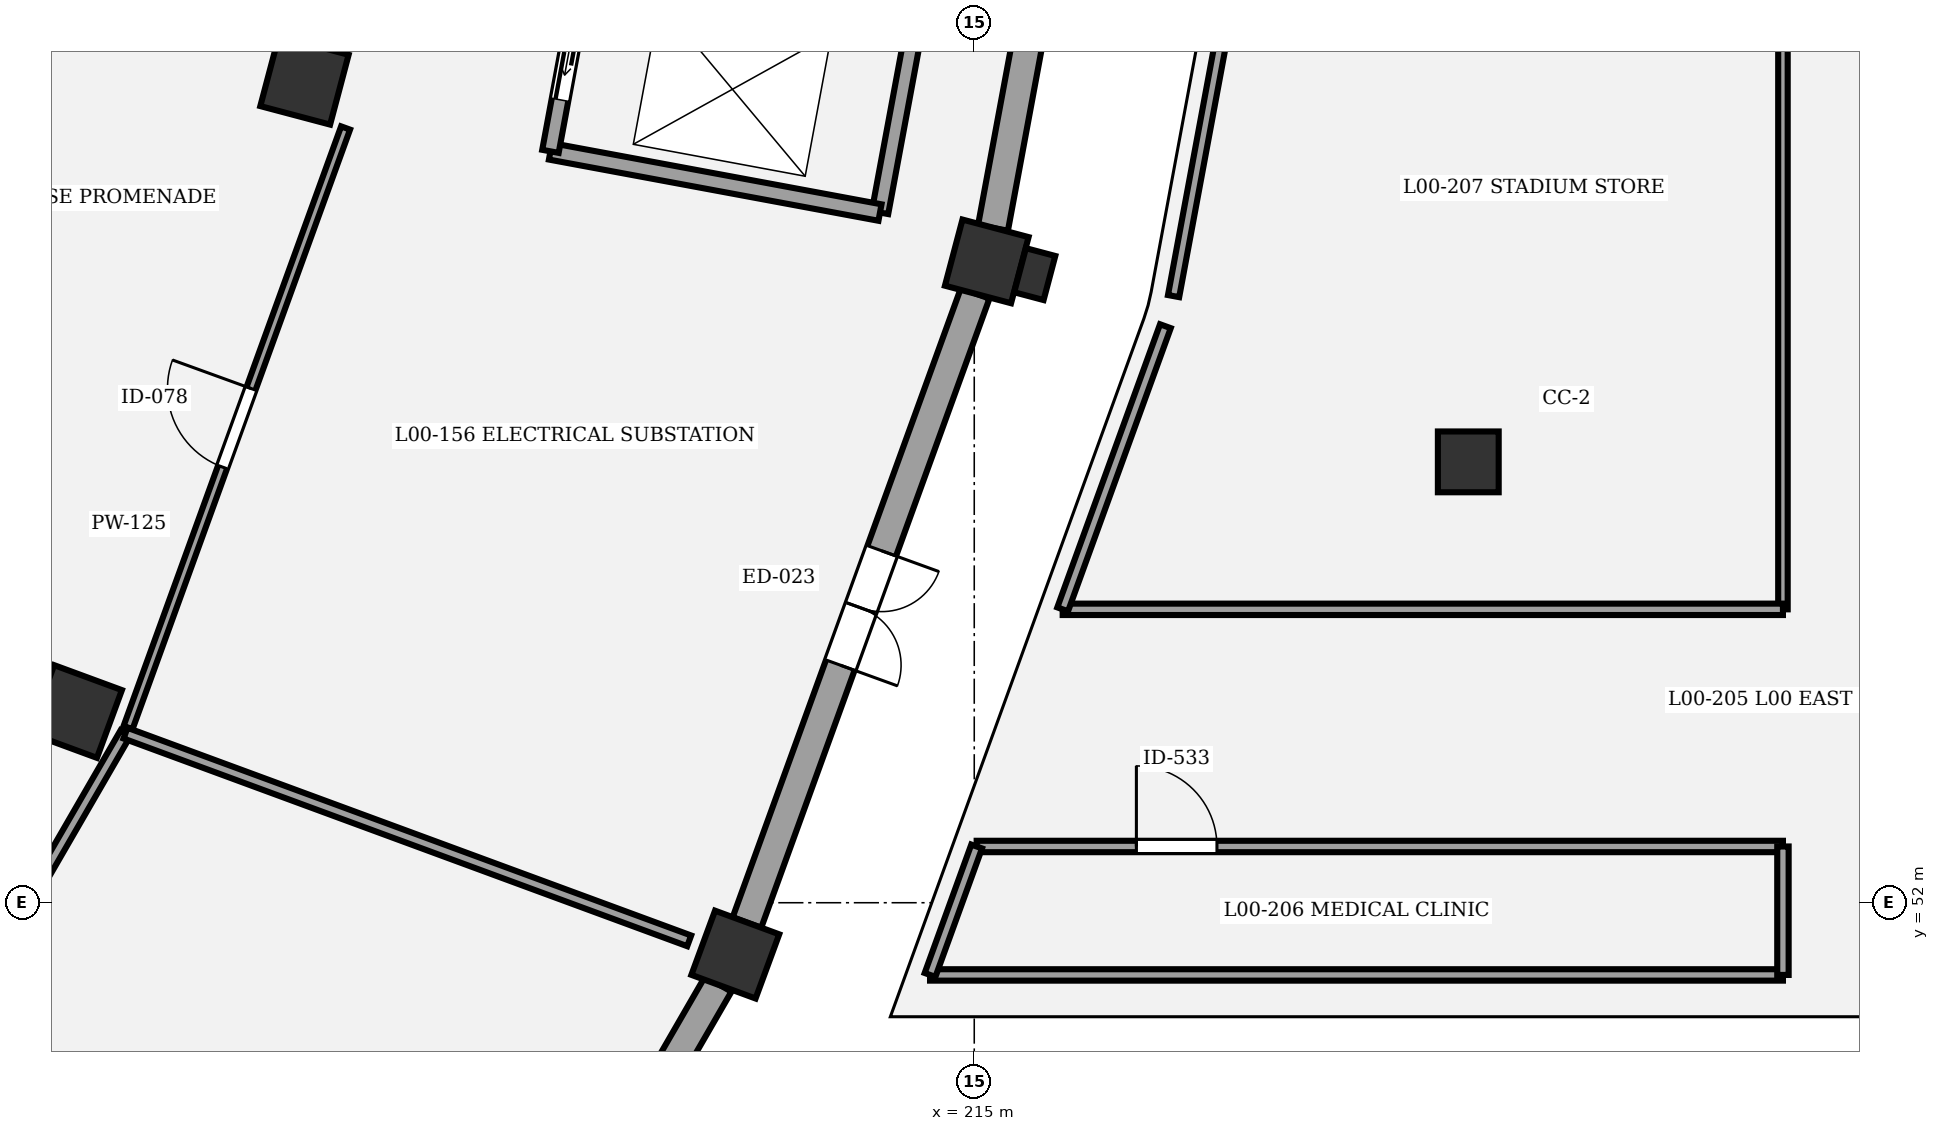
"""IFC4 building model, lengths in metres.
Left out: names, types, materials, properties, quantities, classifications, styles, units other than length and angle.
Written with IfcOpenShell. Run it as: python <this file> out.ifc"""

import sys

from ifc_helpers import new_model, si_unit, direction, frame, frame_2d, origin, origin_2d, place, context, subcontext, project, spatial, rectangle, circle, extrude, element, fill, save


model = new_model("IFC4")
c1 = context("Model", 3, precision=1e-05, world=origin(), true_north=direction((0.0, 1.0)))
c2 = subcontext(c1, "Body", "Model", "MODEL_VIEW")
j1 = project(units=[si_unit("LENGTHUNIT", "METRE"), si_unit("PLANEANGLEUNIT", "RADIAN")], contexts=[c1])
p1 = place(None, origin())
s1 = spatial("IfcSite", under=j1, at=p1, CompositionType="ELEMENT")
p2 = place(p1, origin())
s2 = spatial("IfcBuilding", under=s1, at=p2, CompositionType="ELEMENT")
p3 = place(p2, origin())
s3 = spatial("IfcBuildingStorey", under=s2, at=p3, CompositionType="ELEMENT", Elevation=0.0)
p4 = place(p3, frame((203.176, 54.516, 0.0), z_axis=(0.0, 0.0, 1.0), x_axis=(0.938372433776, -0.34562577382, 0.0)))
e1 = element("IfcColumn", 1, at=p4, inside=s3, PredefinedType="COLUMN", context=c2, shape_type="SweptSolid", body=[
    extrude(rectangle(XDim=0.95, YDim=0.95, at=origin_2d()), origin(), (0.0, 0.0, 1.0), 5.4),
])
p5 = place(p3, frame((211.856, 51.318, 0.0), z_axis=(0.0, 0.0, 1.0), x_axis=(0.938372433776, -0.34562577382, 0.0)))
e2 = element("IfcColumn", 2, at=p5, inside=s3, PredefinedType="COLUMN", context=c2, shape_type="SweptSolid", body=[
    extrude(rectangle(XDim=0.9, YDim=0.9, at=origin_2d()), origin(), (0.0, 0.0, 1.0), 5.4),
])
p6 = place(p3, frame((206.188, 62.818, 0.0), z_axis=(0.0, 0.0, 1.0), x_axis=(0.966600102017, -0.256289373133, 0.0)))
e3 = element("IfcColumn", 3, at=p6, inside=s3, PredefinedType="COLUMN", context=c2, shape_type="SweptSolid", body=[
    extrude(rectangle(XDim=0.95, YDim=0.95, at=origin_2d()), origin(), (0.0, 0.0, 1.0), 5.4),
])
p7 = place(p3, frame((215.165, 60.438, 0.0), z_axis=(0.0, 0.0, 1.0), x_axis=(0.966600102017, -0.256289373133, 0.0)))
e4 = element("IfcColumn", 4, at=p7, inside=s3, PredefinedType="COLUMN", context=c2, shape_type="SweptSolid", body=[
    extrude(rectangle(XDim=0.9, YDim=0.9, at=origin_2d()), origin(), (0.0, 0.0, 1.0), 5.4),
])
p8 = place(p3, frame((215.796, 60.27, 0.0), z_axis=(0.0, 0.0, 1.0), x_axis=(0.256289373133, 0.966600102017, 0.0)))
e5 = element("IfcColumn", 5, at=p8, inside=s3, PredefinedType="PILASTER", context=c2, shape_type="SweptSolid", body=[
    extrude(rectangle(XDim=0.6, YDim=0.4, at=origin_2d()), origin(), (0.0, 0.0, 1.0), 5.4),
])
p9 = place(p3, frame((221.5, 57.8, 0.0), z_axis=(0.0, 0.0, 1.0), x_axis=(1.0, 0.0, 0.0)))
e6 = element("IfcColumn", 6, at=p9, inside=s3, PredefinedType="COLUMN", context=c2, shape_type="SweptSolid", body=[
    extrude(circle(Radius=0.4, at=origin_2d()), origin(), (0.0, 0.0, 1.0), 5.4),
])
p10 = place(p3, frame((211.632, 50.93, 0.0), z_axis=(0.0, 0.0, 1.0), x_axis=(-0.500543493437, -0.865711390232, 0.0)))
e7 = element("IfcWall", 7, at=p10, inside=s3, PredefinedType="STANDARD", context=c2, shape_type="SweptSolid", body=[
    extrude(rectangle(XDim=8.321, YDim=0.4, at=frame_2d((4.161, 0.0))), origin(), (0.0, 0.0, 1.0), 4.25),
])
p11 = place(p10, frame((2.961, 0.0, 0.0)))
e8 = element("IfcOpeningElement", 8, at=p11, cuts=e7, PredefinedType="OPENING", context=c2, shape_type="SweptSolid", body=[
    extrude(rectangle(XDim=2.4, YDim=2.55, at=frame_2d((1.2, 1.275))), frame((0.0, 0.21, 0.0), z_axis=(0.0, -1.0, 0.0), x_axis=(1.0, 0.0, 0.0)), (0.0, 0.0, 1.0), 0.42),
])
p12 = place(p3, frame((215.012, 60.016, 0.0), z_axis=(0.0, 0.0, 1.0), x_axis=(-0.341030587203, -0.940052199929, 0.0)))
e9 = element("IfcWall", 9, at=p12, inside=s3, PredefinedType="STANDARD", context=c2, shape_type="SweptSolid", body=[
    extrude(rectangle(XDim=8.805, YDim=0.4, at=frame_2d((4.403, 0.0))), origin(), (0.0, 0.0, 1.0), 4.25),
])
p13 = place(p12, frame((3.603, 0.0, 0.0)))
e10 = element("IfcOpeningElement", 10, at=p13, cuts=e9, PredefinedType="OPENING", context=c2, shape_type="SweptSolid", body=[
    extrude(rectangle(XDim=1.6, YDim=2.3, at=frame_2d((0.8, 1.15))), frame((0.0, 0.21, 0.0), z_axis=(0.0, -1.0, 0.0), x_axis=(1.0, 0.0, 0.0)), (0.0, 0.0, 1.0), 0.42),
])
p14 = place(p3, frame((217.073, 70.715, 0.0), z_axis=(0.0, 0.0, 1.0), x_axis=(-0.182624880635, -0.98318266511, 0.0)))
e11 = element("IfcWall", 11, at=p14, inside=s3, PredefinedType="STANDARD", context=c2, shape_type="SweptSolid", body=[
    extrude(rectangle(XDim=10.005, YDim=0.4, at=frame_2d((5.002, 0.0))), origin(), (0.0, 0.0, 1.0), 4.25),
])
p15 = place(p14, frame((3.823, 0.0, 1.1)))
e12 = element("IfcOpeningElement", 12, at=p15, cuts=e11, PredefinedType="OPENING", context=c2, shape_type="SweptSolid", body=[
    extrude(rectangle(XDim=2.36, YDim=1.55, at=frame_2d((1.18, 0.775))), frame((0.0, 0.21, 0.0), z_axis=(0.0, -1.0, 0.0), x_axis=(1.0, 0.0, 0.0)), (0.0, 0.0, 1.0), 0.42),
])
p16 = place(p3, frame((215.772, 71.915, 0.0), z_axis=(0.0, 0.0, 1.0), x_axis=(-0.182574755222, -0.983191974517, 0.0)))
e13 = element("IfcWall", 13, at=p16, inside=s3, PredefinedType="SHEAR", context=c2, shape_type="SweptSolid", body=[
    extrude(rectangle(XDim=11.02, YDim=0.22, at=frame_2d((5.51, 0.0))), origin(), (0.0, 0.0, 1.0), 5.15),
])
p17 = place(p3, frame((209.424, 61.885, 0.0), z_axis=(0.0, 0.0, 1.0), x_axis=(0.983189729951, -0.18258684213, 0.0)))
e14 = element("IfcWall", 14, at=p17, inside=s3, PredefinedType="SHEAR", context=c2, shape_type="SweptSolid", body=[
    extrude(rectangle(XDim=4.41, YDim=0.22, at=frame_2d((2.205, 0.0))), origin(), (0.0, 0.0, 1.0), 5.15),
])
p18 = place(p3, frame((211.436, 72.72, 0.0), z_axis=(0.0, 0.0, 1.0), x_axis=(-0.182570778451, -0.983192712979, 0.0)))
e15 = element("IfcWall", 15, at=p18, inside=s3, PredefinedType="SHEAR", context=c2, shape_type="SweptSolid", body=[
    extrude(rectangle(XDim=11.02, YDim=0.22, at=frame_2d((5.51, 0.0))), origin(), (0.0, 0.0, 1.0), 5.15),
])
p19 = place(p18, frame((0.3, 0.0, 0.0)))
e16 = element("IfcOpeningElement", 16, at=p19, cuts=e15, PredefinedType="OPENING", context=c2, shape_type="SweptSolid", body=[
    extrude(rectangle(XDim=1.15, YDim=2.15, at=frame_2d((0.575, 1.075))), frame((0.0, 0.12, 0.0), z_axis=(0.0, -1.0, 0.0), x_axis=(1.0, 0.0, 0.0)), (0.0, 0.0, 1.0), 0.24),
])
p20 = place(p18, frame((9.23, 0.0, 0.0)))
e17 = element("IfcOpeningElement", 17, at=p20, cuts=e15, PredefinedType="OPENING", context=c2, shape_type="SweptSolid", body=[
    extrude(rectangle(XDim=1.1, YDim=2.15, at=frame_2d((0.55, 1.075))), frame((0.0, 0.12, 0.0), z_axis=(0.0, -1.0, 0.0), x_axis=(1.0, 0.0, 0.0)), (0.0, 0.0, 1.0), 0.24),
])
p21 = place(p3, frame((199.641, 46.981, 0.0), z_axis=(0.0, 0.0, 1.0), x_axis=(0.500559280672, 0.865702262059, 0.0)))
e18 = element("IfcWall", 18, at=p21, inside=s3, PredefinedType="PARTITIONING", context=c2, shape_type="SweptSolid", body=[
    extrude(rectangle(XDim=8.375, YDim=0.15, at=frame_2d((4.187, 0.0))), origin(), (0.0, 0.0, 1.0), 4.15),
])
p22 = place(p21, frame((3.677, 0.0, 0.0)))
e19 = element("IfcOpeningElement", 19, at=p22, cuts=e18, PredefinedType="OPENING", context=c2, shape_type="SweptSolid", body=[
    extrude(rectangle(XDim=1.02, YDim=2.1, at=frame_2d((0.51, 1.05))), frame((0.0, 0.085, 0.0), z_axis=(0.0, -1.0, 0.0), x_axis=(1.0, 0.0, 0.0)), (0.0, 0.0, 1.0), 0.17),
])
p23 = place(p3, frame((203.866, 54.304, 0.0), z_axis=(0.0, 0.0, 1.0), x_axis=(0.341044550343, 0.940047134287, 0.0)))
e20 = element("IfcWall", 20, at=p23, inside=s3, PredefinedType="PARTITIONING", context=c2, shape_type="SweptSolid", body=[
    extrude(rectangle(XDim=8.392, YDim=0.125, at=frame_2d((4.196, 0.0))), origin(), (0.0, 0.0, 1.0), 4.15),
])
p24 = place(p23, frame((3.646, 0.0, 0.0)))
e21 = element("IfcOpeningElement", 21, at=p24, cuts=e20, PredefinedType="OPENING", context=c2, shape_type="SweptSolid", body=[
    extrude(rectangle(XDim=1.1, YDim=2.1, at=frame_2d((0.55, 1.05))), frame((0.0, 0.073, 0.0), z_axis=(0.0, -1.0, 0.0), x_axis=(1.0, 0.0, 0.0)), (0.0, 0.0, 1.0), 0.145),
])
p25 = place(p3, frame((215.031, 52.74, 0.0), z_axis=(0.0, 0.0, 1.0), x_axis=(1.0, 0.0, 0.0)))
e22 = element("IfcWall", 22, at=p25, inside=s3, PredefinedType="PARTITIONING", context=c2, shape_type="SweptSolid", body=[
    extrude(rectangle(XDim=10.608, YDim=0.15, at=frame_2d((5.304, 0.0))), origin(), (0.0, 0.0, 1.0), 4.15),
])
p26 = place(p25, frame((2.102, 0.0, 0.0)))
e23 = element("IfcOpeningElement", 23, at=p26, cuts=e22, PredefinedType="OPENING", context=c2, shape_type="SweptSolid", body=[
    extrude(rectangle(XDim=1.06, YDim=2.3, at=frame_2d((0.53, 1.15))), frame((0.0, 0.085, 0.0), z_axis=(0.0, -1.0, 0.0), x_axis=(1.0, 0.0, 0.0)), (0.0, 0.0, 1.0), 0.17),
])
p27 = place(p3, frame((225.64, 74.55, 0.0), z_axis=(0.0, 0.0, 1.0), x_axis=(0.0, -1.0, 0.0)))
e24 = element("IfcWall", 24, at=p27, inside=s3, PredefinedType="PARTITIONING", context=c2, shape_type="SweptSolid", body=[
    extrude(rectangle(XDim=18.69, YDim=0.125, at=frame_2d((9.345, 0.0))), origin(), (0.0, 0.0, 1.0), 4.15),
])
p28 = place(p27, frame((6.252, 0.0, 0.0)))
e25 = element("IfcOpeningElement", 25, at=p28, cuts=e24, PredefinedType="OPENING", context=c2, shape_type="SweptSolid", body=[
    extrude(rectangle(XDim=1.1, YDim=2.3, at=frame_2d((0.55, 1.15))), frame((0.0, 0.073, 0.0), z_axis=(0.0, -1.0, 0.0), x_axis=(1.0, 0.0, 0.0)), (0.0, 0.0, 1.0), 0.145),
])
p29 = place(p3, frame((203.833, 54.231, 0.0), z_axis=(0.0, 0.0, 1.0), x_axis=(0.938352081903, -0.34568102405, 0.0)))
e26 = element("IfcWall", 26, at=p29, inside=s3, PredefinedType="PARTITIONING", context=c2, shape_type="SweptSolid", body=[
    extrude(rectangle(XDim=7.904, YDim=0.15, at=frame_2d((3.952, 0.0))), origin(), (0.0, 0.0, 1.0), 4.15),
])
p30 = place(p3, frame((225.64, 51.05, 0.0), z_axis=(0.0, 0.0, 1.0), x_axis=(-1.0, 0.0, 0.0)))
e27 = element("IfcWall", 27, at=p30, inside=s3, PredefinedType="PARTITIONING", context=c2, shape_type="SweptSolid", body=[
    extrude(rectangle(XDim=11.221, YDim=0.15, at=frame_2d((5.611, 0.0))), origin(), (0.0, 0.0, 1.0), 4.15),
])
p31 = place(p3, frame((214.418, 51.05, 0.0), z_axis=(0.0, 0.0, 1.0), x_axis=(0.341012375502, 0.940058806541, 0.0)))
e28 = element("IfcWall", 28, at=p31, inside=s3, PredefinedType="PARTITIONING", context=c2, shape_type="SweptSolid", body=[
    extrude(rectangle(XDim=1.798, YDim=0.15, at=frame_2d((0.899, 0.0))), origin(), (0.0, 0.0, 1.0), 4.15),
])
p32 = place(p3, frame((225.64, 52.74, 0.0), z_axis=(0.0, 0.0, 1.0), x_axis=(0.0, -1.0, 0.0)))
e29 = element("IfcWall", 29, at=p32, inside=s3, PredefinedType="PARTITIONING", context=c2, shape_type="SweptSolid", body=[
    extrude(rectangle(XDim=1.69, YDim=0.15, at=frame_2d((0.845, 0.0))), origin(), (0.0, 0.0, 1.0), 4.15),
])
p33 = place(p3, frame((217.623, 59.981, 0.0), z_axis=(0.0, 0.0, 1.0), x_axis=(0.182620957058, 0.983183393901, 0.0)))
e30 = element("IfcWall", 30, at=p33, inside=s3, PredefinedType="PARTITIONING", context=c2, shape_type="SweptSolid", body=[
    extrude(rectangle(XDim=10.901, YDim=0.15, at=frame_2d((5.45, 0.0))), origin(), (0.0, 0.0, 1.0), 4.15),
])
p34 = place(p3, frame((225.64, 55.86, 0.0), z_axis=(0.0, 0.0, 1.0), x_axis=(-1.0, 0.0, 0.0)))
e31 = element("IfcWall", 31, at=p34, inside=s3, PredefinedType="PARTITIONING", context=c2, shape_type="SweptSolid", body=[
    extrude(rectangle(XDim=9.477, YDim=0.15, at=frame_2d((4.738, 0.0))), origin(), (0.0, 0.0, 1.0), 4.15),
])
p35 = place(p3, frame((216.163, 55.86, 0.0), z_axis=(0.0, 0.0, 1.0), x_axis=(0.341035525383, 0.94005040845, 0.0)))
e32 = element("IfcWall", 32, at=p35, inside=s3, PredefinedType="PARTITIONING", context=c2, shape_type="SweptSolid", body=[
    extrude(rectangle(XDim=3.962, YDim=0.15, at=frame_2d((1.981, 0.0))), origin(), (0.0, 0.0, 1.0), 4.15),
])
p36 = place(p13, origin())
e33 = element("IfcDoor", 33, at=p36, inside=s3, OperationType="DOUBLE_DOOR_SINGLE_SWING", PredefinedType="DOOR", context=c2, shape_type="SweptSolid", body=[
    extrude(rectangle(XDim=1.6, YDim=2.3, at=frame_2d((0.8, 1.15))), frame((0.0, 0.025, 0.0), z_axis=(0.0, -1.0, 0.0), x_axis=(1.0, 0.0, 0.0)), (0.0, 0.0, 1.0), 0.05),
])
fill(e10, e33)
p37 = place(p20, origin())
e34 = element("IfcDoor", 34, at=p37, inside=s3, OperationType="DOUBLE_DOOR_SLIDING", PredefinedType="DOOR", context=c2, shape_type="SweptSolid", body=[
    extrude(rectangle(XDim=1.1, YDim=2.15, at=frame_2d((0.55, 1.075))), frame((0.0, 0.025, 0.0), z_axis=(0.0, -1.0, 0.0), x_axis=(1.0, 0.0, 0.0)), (0.0, 0.0, 1.0), 0.05),
])
fill(e17, e34)
p38 = place(p24, origin())
e35 = element("IfcDoor", 35, at=p38, inside=s3, OperationType="SINGLE_SWING_RIGHT", PredefinedType="DOOR", context=c2, shape_type="SweptSolid", body=[
    extrude(rectangle(XDim=1.1, YDim=2.1, at=frame_2d((0.55, 1.05))), frame((0.0, 0.025, 0.0), z_axis=(0.0, -1.0, 0.0), x_axis=(1.0, 0.0, 0.0)), (0.0, 0.0, 1.0), 0.05),
])
fill(e21, e35)
p39 = place(p26, origin())
e36 = element("IfcDoor", 36, at=p39, inside=s3, OperationType="SINGLE_SWING_LEFT", PredefinedType="DOOR", context=c2, shape_type="SweptSolid", body=[
    extrude(rectangle(XDim=1.06, YDim=2.3, at=frame_2d((0.53, 1.15))), frame((0.0, 0.025, 0.0), z_axis=(0.0, -1.0, 0.0), x_axis=(1.0, 0.0, 0.0)), (0.0, 0.0, 1.0), 0.05),
])
fill(e23, e36)
save(model, sys.argv[1])
